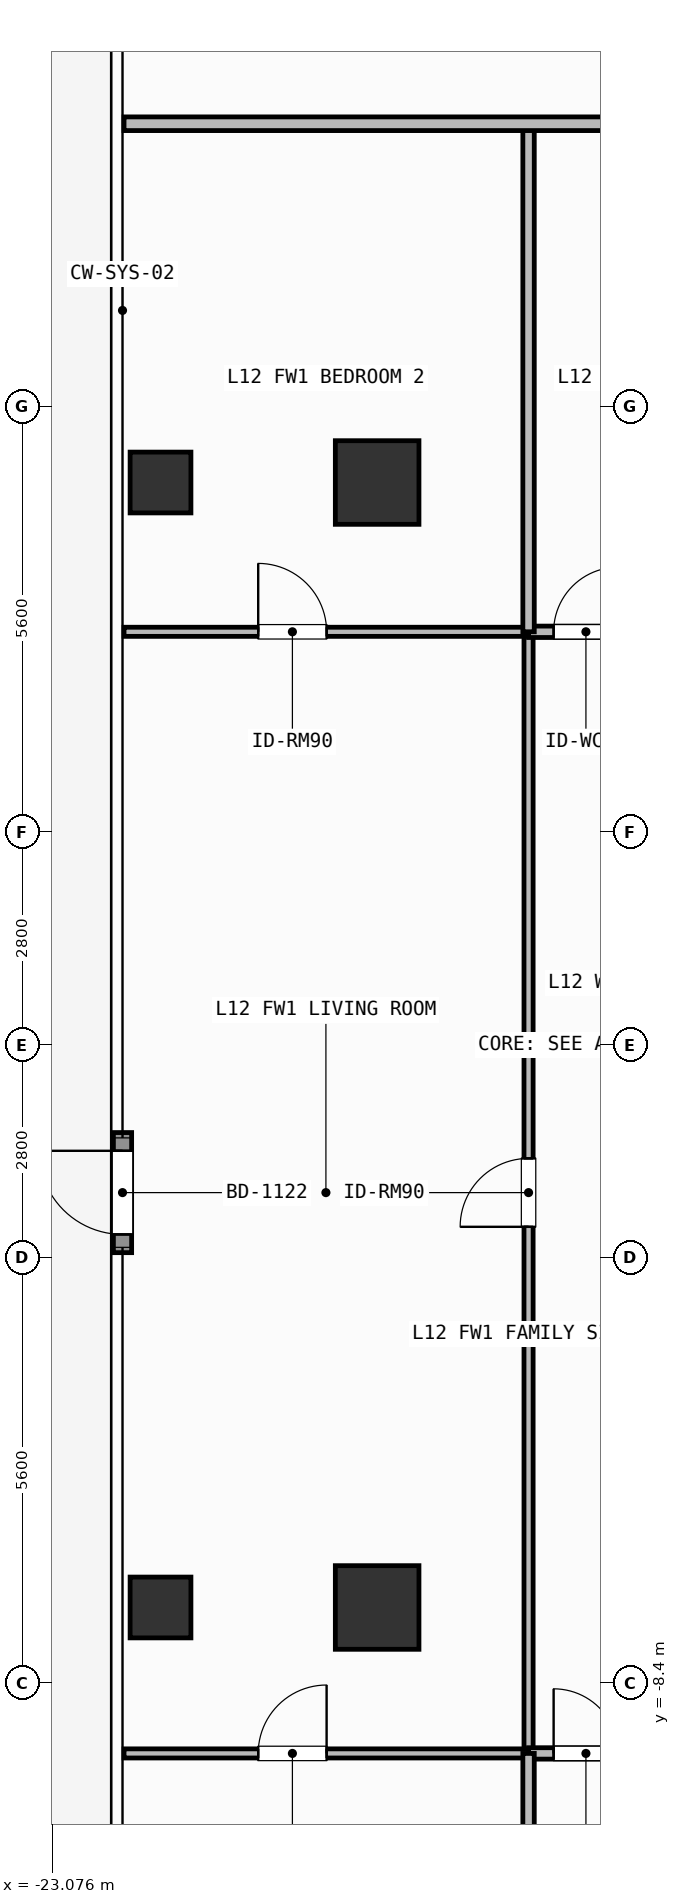
"""IFC4 building model, lengths in metres.
Left out: names, types, materials, properties, quantities, classifications, styles, units other than length and angle.
Written with IfcOpenShell. Run it as: python <this file> out.ifc"""

import sys

from ifc_helpers import new_model, si_unit, direction, frame, frame_2d, origin, origin_2d, place, context, subcontext, project, spatial, rectangle, hollow_rectangle, extrude, element, fill, save


model = new_model("IFC4")
c1 = context("Model", 3, precision=1e-05, world=origin(), true_north=direction((0.0, 1.0)))
c2 = subcontext(c1, "Body", "Model", "MODEL_VIEW")
j1 = project(units=[si_unit("LENGTHUNIT", "METRE"), si_unit("PLANEANGLEUNIT", "RADIAN")], contexts=[c1])
p1 = place(None, origin())
s1 = spatial("IfcSite", under=j1, at=p1, CompositionType="ELEMENT")
p2 = place(p1, origin())
s2 = spatial("IfcBuilding", under=s1, at=p2, CompositionType="ELEMENT")
p3 = place(p2, frame((0.0, 0.0, 46.2)))
s3 = spatial("IfcBuildingStorey", under=s2, at=p3, CompositionType="ELEMENT", Elevation=46.2)
for number, where, z_axis, x_axis in (
    (1, (-18.8, -7.4, 0.0), (0.0, 0.0, 1.0), (1.0, 0.0, 0.0)),
    (2, (-18.8, 7.4, 0.0), (0.0, 0.0, 1.0), (1.0, 0.0, 0.0)),
):
    element("IfcColumn", number, at=place(p3, frame(where, z_axis=z_axis, x_axis=x_axis)), inside=s3, PredefinedType="COLUMN", context=c2, shape_type="SweptSolid", body=[
        extrude(rectangle(XDim=1.1, YDim=1.1, at=origin_2d()), origin(), (0.0, 0.0, 1.0), 3.9),
    ])
for number, where, z_axis, x_axis in (
    (3, (-21.65, -7.4, 0.0), (0.0, 0.0, 1.0), (1.0, 0.0, 0.0)),
    (4, (-21.65, 7.4, 0.0), (0.0, 0.0, 1.0), (1.0, 0.0, 0.0)),
):
    element("IfcColumn", number, at=place(p3, frame(where, z_axis=z_axis, x_axis=x_axis)), inside=s3, PredefinedType="COLUMN", context=c2, shape_type="SweptSolid", body=[
        extrude(hollow_rectangle(XDim=0.8, YDim=0.8, WallThickness=0.036, at=origin_2d()), origin(), (0.0, 0.0, 1.0), 3.9),
    ])
p4 = place(p3, frame((-22.15, -2.732, 0.0), z_axis=(0.0, 0.0, 1.0), x_axis=(0.0, 1.0, 0.0)))
e5 = element("IfcWall", 5, at=p4, inside=s3, PredefinedType="SOLIDWALL", context=c2, shape_type="SweptSolid", body=[
    extrude(rectangle(XDim=1.58, YDim=0.24, at=frame_2d((0.79, 0.0))), origin(), (0.0, 0.0, 1.0), 3.68),
])
p5 = place(p4, frame((0.24, 0.0, 0.0)))
e6 = element("IfcOpeningElement", 6, at=p5, cuts=e5, PredefinedType="OPENING", context=c2, shape_type="SweptSolid", body=[
    extrude(rectangle(XDim=1.1, YDim=2.2, at=frame_2d((0.55, 1.1))), frame((0.0, 0.13, 0.0), z_axis=(0.0, -1.0, 0.0), x_axis=(1.0, 0.0, 0.0)), (0.0, 0.0, 1.0), 0.26),
])
p6 = place(p3, frame((-16.808, -9.32, 0.0), z_axis=(0.0, 0.0, 1.0), x_axis=(0.0, 1.0, 0.0)))
e7 = element("IfcWall", 7, at=p6, inside=s3, PredefinedType="PARTITIONING", context=c2, shape_type="SweptSolid", body=[
    extrude(rectangle(XDim=14.756, YDim=0.12, at=frame_2d((7.378, 0.0))), origin(), (0.0, 0.0, 1.0), 3.68),
])
p7 = place(p6, frame((6.928, 0.0, 0.0)))
e8 = element("IfcOpeningElement", 8, at=p7, cuts=e7, PredefinedType="OPENING", context=c2, shape_type="SweptSolid", body=[
    extrude(rectangle(XDim=0.9, YDim=2.1, at=frame_2d((0.45, 1.05))), frame((0.0, 0.07, 0.0), z_axis=(0.0, -1.0, 0.0), x_axis=(1.0, 0.0, 0.0)), (0.0, 0.0, 1.0), 0.14),
])
p8 = place(p3, frame((-16.808, 5.436, 0.0), z_axis=(0.0, 0.0, 1.0), x_axis=(1.0, 0.0, 0.0)))
e9 = element("IfcWall", 9, at=p8, inside=s3, PredefinedType="PARTITIONING", context=c2, shape_type="SweptSolid", body=[
    extrude(rectangle(XDim=3.208, YDim=0.15, at=frame_2d((1.604, 0.0))), origin(), (0.0, 0.0, 1.0), 3.68),
])
p9 = place(p8, frame((0.33, 0.0, 0.0)))
e10 = element("IfcOpeningElement", 10, at=p9, cuts=e9, PredefinedType="OPENING", context=c2, shape_type="SweptSolid", body=[
    extrude(rectangle(XDim=0.85, YDim=2.1, at=frame_2d((0.425, 1.05))), frame((0.0, 0.085, 0.0), z_axis=(0.0, -1.0, 0.0), x_axis=(1.0, 0.0, 0.0)), (0.0, 0.0, 1.0), 0.17),
])
p10 = place(p3, frame((-16.808, -9.32, 0.0), z_axis=(0.0, 0.0, 1.0), x_axis=(1.0, 0.0, 0.0)))
e11 = element("IfcWall", 11, at=p10, inside=s3, PredefinedType="PARTITIONING", context=c2, shape_type="SweptSolid", body=[
    extrude(rectangle(XDim=3.208, YDim=0.15, at=frame_2d((1.604, 0.0))), origin(), (0.0, 0.0, 1.0), 3.68),
])
p11 = place(p10, frame((0.33, 0.0, 0.0)))
e12 = element("IfcOpeningElement", 12, at=p11, cuts=e11, PredefinedType="OPENING", context=c2, shape_type="SweptSolid", body=[
    extrude(rectangle(XDim=0.85, YDim=2.1, at=frame_2d((0.425, 1.05))), frame((0.0, 0.085, 0.0), z_axis=(0.0, -1.0, 0.0), x_axis=(1.0, 0.0, 0.0)), (0.0, 0.0, 1.0), 0.17),
])
p12 = place(p3, frame((-22.13, -9.32, 0.0), z_axis=(0.0, 0.0, 1.0), x_axis=(1.0, 0.0, 0.0)))
e13 = element("IfcWall", 13, at=p12, inside=s3, PredefinedType="PARTITIONING", context=c2, shape_type="SweptSolid", body=[
    extrude(rectangle(XDim=5.322, YDim=0.12, at=frame_2d((2.661, 0.0))), origin(), (0.0, 0.0, 1.0), 3.68),
])
p13 = place(p12, frame((1.765, 0.0, 0.0)))
e14 = element("IfcOpeningElement", 14, at=p13, cuts=e13, PredefinedType="OPENING", context=c2, shape_type="SweptSolid", body=[
    extrude(rectangle(XDim=0.9, YDim=2.1, at=frame_2d((0.45, 1.05))), frame((0.0, 0.07, 0.0), z_axis=(0.0, -1.0, 0.0), x_axis=(1.0, 0.0, 0.0)), (0.0, 0.0, 1.0), 0.14),
])
p14 = place(p3, frame((-22.13, 5.436, 0.0), z_axis=(0.0, 0.0, 1.0), x_axis=(1.0, 0.0, 0.0)))
e15 = element("IfcWall", 15, at=p14, inside=s3, PredefinedType="PARTITIONING", context=c2, shape_type="SweptSolid", body=[
    extrude(rectangle(XDim=5.322, YDim=0.12, at=frame_2d((2.661, 0.0))), origin(), (0.0, 0.0, 1.0), 3.68),
])
p15 = place(p14, frame((1.765, 0.0, 0.0)))
e16 = element("IfcOpeningElement", 16, at=p15, cuts=e15, PredefinedType="OPENING", context=c2, shape_type="SweptSolid", body=[
    extrude(rectangle(XDim=0.9, YDim=2.1, at=frame_2d((0.45, 1.05))), frame((0.0, 0.07, 0.0), z_axis=(0.0, -1.0, 0.0), x_axis=(1.0, 0.0, 0.0)), (0.0, 0.0, 1.0), 0.14),
])
p16 = place(p3, frame((-16.808, -12.12, 0.0), z_axis=(0.0, 0.0, 1.0), x_axis=(0.0, 1.0, 0.0)))
e17 = element("IfcWall", 17, at=p16, inside=s3, PredefinedType="PARTITIONING", context=c2, shape_type="SweptSolid", body=[
    extrude(rectangle(XDim=2.8, YDim=0.15, at=frame_2d((1.4, 0.0))), origin(), (0.0, 0.0, 1.0), 3.68),
])
p17 = place(p3, frame((-16.808, 5.436, 0.0), z_axis=(0.0, 0.0, 1.0), x_axis=(0.0, 1.0, 0.0)))
e18 = element("IfcWall", 18, at=p17, inside=s3, PredefinedType="PARTITIONING", context=c2, shape_type="SweptSolid", body=[
    extrude(rectangle(XDim=6.684, YDim=0.15, at=frame_2d((3.342, 0.0))), origin(), (0.0, 0.0, 1.0), 3.68),
])
p18 = place(p3, frame((-22.13, 12.12, 0.0), z_axis=(0.0, 0.0, 1.0), x_axis=(1.0, 0.0, 0.0)))
e19 = element("IfcWall", 19, at=p18, inside=s3, PredefinedType="PARTITIONING", context=c2, shape_type="SweptSolid", body=[
    extrude(rectangle(XDim=8.53, YDim=0.18, at=frame_2d((4.265, 0.0))), origin(), (0.0, 0.0, 1.0), 3.68),
])
p19 = place(p5, origin())
e20 = element("IfcDoor", 20, at=p19, inside=s3, OperationType="SINGLE_SWING_RIGHT", PredefinedType="DOOR", context=c2, shape_type="SweptSolid", body=[
    extrude(rectangle(XDim=1.1, YDim=2.2, at=frame_2d((0.55, 1.1))), frame((0.0, 0.025, 0.0), z_axis=(0.0, -1.0, 0.0), x_axis=(1.0, 0.0, 0.0)), (0.0, 0.0, 1.0), 0.05),
])
fill(e6, e20)
p20 = place(p7, origin())
e21 = element("IfcDoor", 21, at=p20, inside=s3, OperationType="SINGLE_SWING_LEFT", PredefinedType="DOOR", context=c2, shape_type="SweptSolid", body=[
    extrude(rectangle(XDim=0.9, YDim=2.1, at=frame_2d((0.45, 1.05))), frame((0.0, 0.025, 0.0), z_axis=(0.0, -1.0, 0.0), x_axis=(1.0, 0.0, 0.0)), (0.0, 0.0, 1.0), 0.05),
])
fill(e8, e21)
p21 = place(p9, origin())
e22 = element("IfcDoor", 22, at=p21, inside=s3, OperationType="SINGLE_SWING_RIGHT", PredefinedType="DOOR", context=c2, shape_type="SweptSolid", body=[
    extrude(rectangle(XDim=0.85, YDim=2.1, at=frame_2d((0.425, 1.05))), frame((0.0, 0.025, 0.0), z_axis=(0.0, -1.0, 0.0), x_axis=(1.0, 0.0, 0.0)), (0.0, 0.0, 1.0), 0.05),
])
fill(e10, e22)
p22 = place(p11, origin())
e23 = element("IfcDoor", 23, at=p22, inside=s3, OperationType="SINGLE_SWING_LEFT", PredefinedType="DOOR", context=c2, shape_type="SweptSolid", body=[
    extrude(rectangle(XDim=0.85, YDim=2.1, at=frame_2d((0.425, 1.05))), frame((0.0, 0.025, 0.0), z_axis=(0.0, -1.0, 0.0), x_axis=(1.0, 0.0, 0.0)), (0.0, 0.0, 1.0), 0.05),
])
fill(e12, e23)
p23 = place(p13, origin())
e24 = element("IfcDoor", 24, at=p23, inside=s3, OperationType="SINGLE_SWING_RIGHT", PredefinedType="DOOR", context=c2, shape_type="SweptSolid", body=[
    extrude(rectangle(XDim=0.9, YDim=2.1, at=frame_2d((0.45, 1.05))), frame((0.0, 0.025, 0.0), z_axis=(0.0, -1.0, 0.0), x_axis=(1.0, 0.0, 0.0)), (0.0, 0.0, 1.0), 0.05),
])
fill(e14, e24)
p24 = place(p15, origin())
e25 = element("IfcDoor", 25, at=p24, inside=s3, OperationType="SINGLE_SWING_LEFT", PredefinedType="DOOR", context=c2, shape_type="SweptSolid", body=[
    extrude(rectangle(XDim=0.9, YDim=2.1, at=frame_2d((0.45, 1.05))), frame((0.0, 0.025, 0.0), z_axis=(0.0, -1.0, 0.0), x_axis=(1.0, 0.0, 0.0)), (0.0, 0.0, 1.0), 0.05),
])
fill(e16, e25)
save(model, sys.argv[1])
